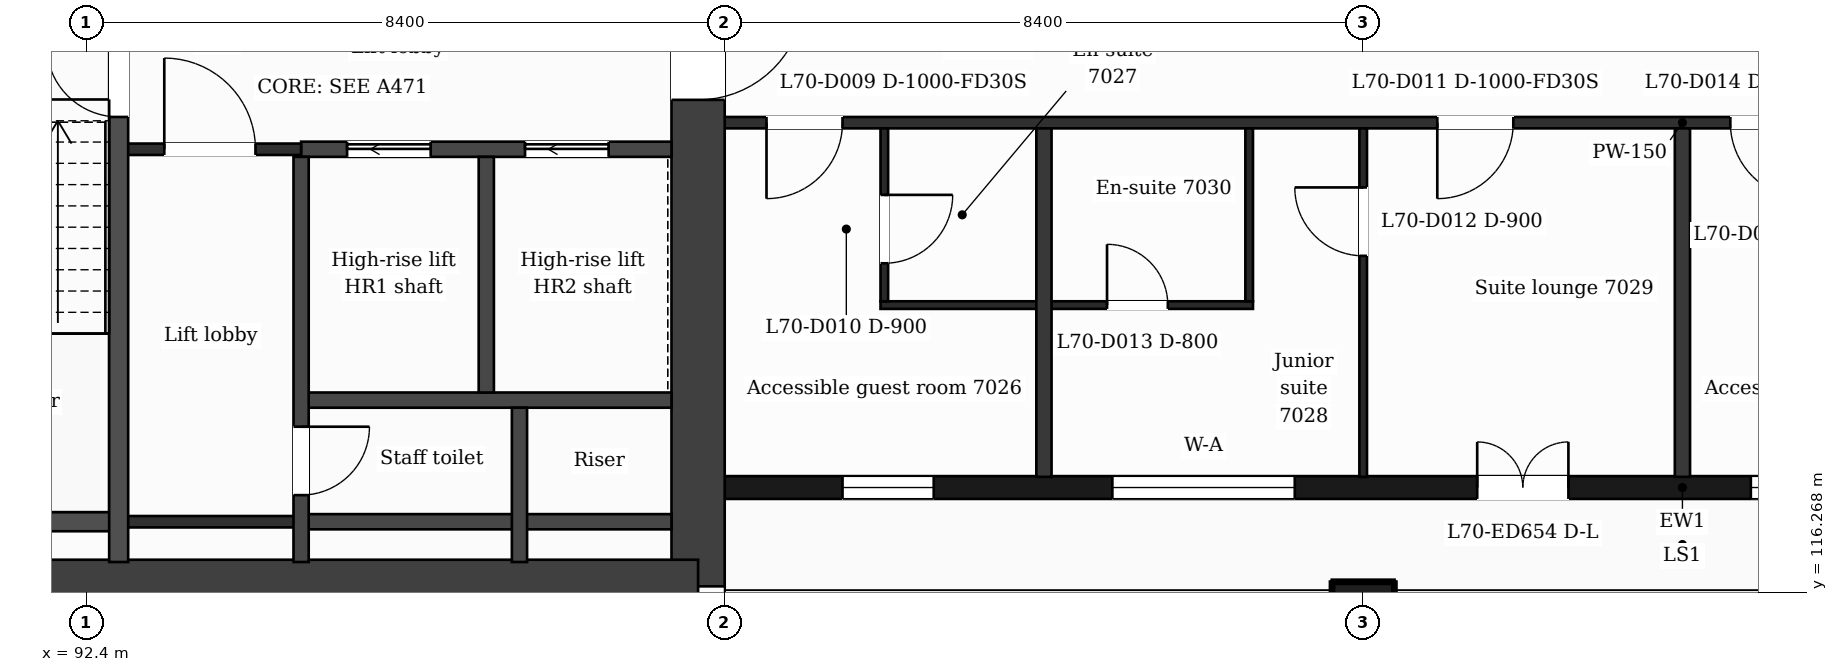
"""IFC4 building model, lengths in metres.
Left out: names, types, materials, properties, quantities, classifications, styles, units other than length and angle.
Written with IfcOpenShell. Run it as: python <this file> out.ifc"""

import sys

from ifc_helpers import new_model, si_unit, direction, frame, frame_2d, origin, origin_2d, place, context, subcontext, project, spatial, rectangle, extrude, element, fill, save


model = new_model("IFC4")
c1 = context("Model", 3, precision=1e-05, world=origin(), true_north=direction((0.0, 1.0)))
c2 = subcontext(c1, "Body", "Model", "MODEL_VIEW")
j1 = project(units=[si_unit("LENGTHUNIT", "METRE"), si_unit("PLANEANGLEUNIT", "RADIAN")], contexts=[c1])
p1 = place(None, origin())
s1 = spatial("IfcSite", under=j1, at=p1, CompositionType="ELEMENT")
p2 = place(p1, origin())
s2 = spatial("IfcBuilding", under=s1, at=p2, CompositionType="ELEMENT")
p3 = place(p2, frame((0.0, 0.0, 288.6)))
s3 = spatial("IfcBuildingStorey", under=s2, at=p3, CompositionType="ELEMENT", Elevation=288.6)
p4 = place(p3, frame((100.45, 132.05, 0.0), z_axis=(0.0, 0.0, 1.0), x_axis=(0.0, -1.0, 0.0)))
e1 = element("IfcWall", 1, at=p4, inside=s3, PredefinedType="SHEAR", context=c2, shape_type="SweptSolid", body=[
    extrude(rectangle(XDim=15.7, YDim=0.7, at=frame_2d((7.85, 0.0))), origin(), (0.0, 0.0, 1.0), 3.7),
])
p5 = place(p4, frame((7.9, 0.0, 0.0)))
e2 = element("IfcOpeningElement", 2, at=p5, cuts=e1, PredefinedType="OPENING", context=c2, shape_type="SweptSolid", body=[
    extrude(rectangle(XDim=1.4, YDim=2.1, at=frame_2d((0.7, 1.05))), frame((0.0, 0.36, 0.0), z_axis=(0.0, -1.0, 0.0), x_axis=(1.0, 0.0, 0.0)), (0.0, 0.0, 1.0), 0.72),
])
p6 = place(p3, frame((100.45, 116.35, 0.0), z_axis=(0.0, 0.0, 1.0), x_axis=(-1.0, 0.0, 0.0)))
e3 = element("IfcWall", 3, at=p6, inside=s3, PredefinedType="SHEAR", context=c2, shape_type="SweptSolid", body=[
    extrude(rectangle(XDim=13.627, YDim=0.7, at=frame_2d((6.813, 0.0))), origin(), (0.0, 0.0, 1.0), 3.7),
])
p7 = place(p3, frame((109.2, 116.0, 0.0), z_axis=(0.0, 0.0, 1.0), x_axis=(1.0, 0.0, 0.0)))
e4 = element("IfcColumn", 4, at=p7, inside=s3, PredefinedType="COLUMN", context=c2, shape_type="SweptSolid", body=[
    extrude(rectangle(XDim=0.8, YDim=0.8, at=origin_2d()), origin(), (0.0, 0.0, 1.0), 3.7),
])
p8 = place(p3, frame((100.8, 117.65, 0.0), z_axis=(0.0, 0.0, 1.0), x_axis=(1.0, 0.0, 0.0)))
e5 = element("IfcWall", 5, at=p8, inside=s3, PredefinedType="SOLIDWALL", context=c2, shape_type="SweptSolid", body=[
    extrude(rectangle(XDim=25.2, YDim=0.3, at=frame_2d((12.6, 0.0))), origin(), (0.0, 0.0, 1.0), 3.38),
])
p9 = place(p8, frame((1.55, 0.0, 0.9)))
e6 = element("IfcOpeningElement", 6, at=p9, cuts=e5, PredefinedType="OPENING", context=c2, shape_type="SweptSolid", body=[
    extrude(rectangle(XDim=1.2, YDim=2.1, at=frame_2d((0.6, 1.05))), frame((0.0, 0.16, 0.0), z_axis=(0.0, -1.0, 0.0), x_axis=(1.0, 0.0, 0.0)), (0.0, 0.0, 1.0), 0.32),
])
p10 = place(p8, frame((5.1, 0.0, 0.9)))
e7 = element("IfcOpeningElement", 7, at=p10, cuts=e5, PredefinedType="OPENING", context=c2, shape_type="SweptSolid", body=[
    extrude(rectangle(XDim=2.4, YDim=2.1, at=frame_2d((1.2, 1.05))), frame((0.0, 0.16, 0.0), z_axis=(0.0, -1.0, 0.0), x_axis=(1.0, 0.0, 0.0)), (0.0, 0.0, 1.0), 0.32),
])
p11 = place(p8, frame((9.9, 0.0, 0.0)))
e8 = element("IfcOpeningElement", 8, at=p11, cuts=e5, PredefinedType="OPENING", context=c2, shape_type="SweptSolid", body=[
    extrude(rectangle(XDim=1.2, YDim=2.4, at=frame_2d((0.6, 1.2))), frame((0.0, 0.16, 0.0), z_axis=(0.0, -1.0, 0.0), x_axis=(1.0, 0.0, 0.0)), (0.0, 0.0, 1.0), 0.32),
])
p12 = place(p8, frame((13.5, 0.0, 0.9)))
e9 = element("IfcOpeningElement", 9, at=p12, cuts=e5, PredefinedType="OPENING", context=c2, shape_type="SweptSolid", body=[
    extrude(rectangle(XDim=2.4, YDim=2.1, at=frame_2d((1.2, 1.05))), frame((0.0, 0.16, 0.0), z_axis=(0.0, -1.0, 0.0), x_axis=(1.0, 0.0, 0.0)), (0.0, 0.0, 1.0), 0.32),
])
p13 = place(p8, frame((17.7, 0.0, 0.9)))
e10 = element("IfcOpeningElement", 10, at=p13, cuts=e5, PredefinedType="OPENING", context=c2, shape_type="SweptSolid", body=[
    extrude(rectangle(XDim=2.4, YDim=2.1, at=frame_2d((1.2, 1.05))), frame((0.0, 0.16, 0.0), z_axis=(0.0, -1.0, 0.0), x_axis=(1.0, 0.0, 0.0)), (0.0, 0.0, 1.0), 0.32),
])
p14 = place(p8, frame((21.85, 0.0, 0.9)))
e11 = element("IfcOpeningElement", 11, at=p14, cuts=e5, PredefinedType="OPENING", context=c2, shape_type="SweptSolid", body=[
    extrude(rectangle(XDim=2.4, YDim=2.1, at=frame_2d((1.2, 1.05))), frame((0.0, 0.16, 0.0), z_axis=(0.0, -1.0, 0.0), x_axis=(1.0, 0.0, 0.0)), (0.0, 0.0, 1.0), 0.32),
])
p15 = place(p3, frame((95.227, 117.2, 0.0), z_axis=(0.0, 0.0, 1.0), x_axis=(1.0, 0.0, 0.0)))
e12 = element("IfcWall", 12, at=p15, inside=s3, PredefinedType="PARTITIONING", context=c2, shape_type="SweptSolid", body=[
    extrude(rectangle(XDim=4.873, YDim=0.2, at=frame_2d((2.437, 0.0))), origin(), (0.0, 0.0, 1.0), 3.38),
])
p16 = place(p3, frame((92.827, 117.2, 0.0), z_axis=(0.0, 0.0, 1.0), x_axis=(1.0, 0.0, 0.0)))
e13 = element("IfcWall", 13, at=p16, inside=s3, PredefinedType="PARTITIONING", context=c2, shape_type="SweptSolid", body=[
    extrude(rectangle(XDim=2.4, YDim=0.15, at=frame_2d((1.2, 0.0))), origin(), (0.0, 0.0, 1.0), 3.38),
])
p17 = place(p3, frame((89.552, 117.2, 0.0), z_axis=(0.0, 0.0, 1.0), x_axis=(1.0, 0.0, 0.0)))
e14 = element("IfcWall", 14, at=p17, inside=s3, PredefinedType="PARTITIONING", context=c2, shape_type="SweptSolid", body=[
    extrude(rectangle(XDim=3.275, YDim=0.25, at=frame_2d((1.637, 0.0))), origin(), (0.0, 0.0, 1.0), 3.38),
])
p18 = place(p3, frame((95.227, 118.8, 0.0), z_axis=(0.0, 0.0, 1.0), x_axis=(1.0, 0.0, 0.0)))
e15 = element("IfcWall", 15, at=p18, inside=s3, PredefinedType="PARTITIONING", context=c2, shape_type="SweptSolid", body=[
    extrude(rectangle(XDim=4.873, YDim=0.2, at=frame_2d((2.437, 0.0))), origin(), (0.0, 0.0, 1.0), 3.38),
])
p19 = place(p3, frame((102.85, 120.05, 0.0), z_axis=(0.0, 0.0, 1.0), x_axis=(1.0, 0.0, 0.0)))
e16 = element("IfcWall", 16, at=p19, inside=s3, PredefinedType="PARTITIONING", context=c2, shape_type="SweptSolid", body=[
    extrude(rectangle(XDim=4.9, YDim=0.1, at=frame_2d((2.45, 0.0))), origin(), (0.0, 0.0, 1.0), 3.38),
])
p20 = place(p19, frame((2.98, 0.0, 0.0)))
e17 = element("IfcOpeningElement", 17, at=p20, cuts=e16, PredefinedType="OPENING", context=c2, shape_type="SweptSolid", body=[
    extrude(rectangle(XDim=0.8, YDim=2.1, at=frame_2d((0.4, 1.05))), frame((0.0, 0.06, 0.0), z_axis=(0.0, -1.0, 0.0), x_axis=(1.0, 0.0, 0.0)), (0.0, 0.0, 1.0), 0.12),
])
p21 = place(p3, frame((95.227, 122.1, 0.0), z_axis=(0.0, 0.0, 1.0), x_axis=(1.0, 0.0, 0.0)))
e18 = element("IfcWall", 18, at=p21, inside=s3, PredefinedType="PARTITIONING", context=c2, shape_type="SweptSolid", body=[
    extrude(rectangle(XDim=4.873, YDim=0.2, at=frame_2d((2.437, 0.0))), origin(), (0.0, 0.0, 1.0), 3.38),
])
p22 = place(p21, frame((0.605, 0.0, 0.0)))
e19 = element("IfcOpeningElement", 19, at=p22, cuts=e18, PredefinedType="OPENING", context=c2, shape_type="SweptSolid", body=[
    extrude(rectangle(XDim=1.1, YDim=2.1, at=frame_2d((0.55, 1.05))), frame((0.0, 0.11, 0.0), z_axis=(0.0, -1.0, 0.0), x_axis=(1.0, 0.0, 0.0)), (0.0, 0.0, 1.0), 0.22),
])
p23 = place(p21, frame((2.946, 0.0, 0.0)))
e20 = element("IfcOpeningElement", 20, at=p23, cuts=e18, PredefinedType="OPENING", context=c2, shape_type="SweptSolid", body=[
    extrude(rectangle(XDim=1.1, YDim=2.1, at=frame_2d((0.55, 1.05))), frame((0.0, 0.11, 0.0), z_axis=(0.0, -1.0, 0.0), x_axis=(1.0, 0.0, 0.0)), (0.0, 0.0, 1.0), 0.22),
])
p24 = place(p3, frame((92.827, 122.1, 0.0), z_axis=(0.0, 0.0, 1.0), x_axis=(1.0, 0.0, 0.0)))
e21 = element("IfcWall", 21, at=p24, inside=s3, PredefinedType="PARTITIONING", context=c2, shape_type="SweptSolid", body=[
    extrude(rectangle(XDim=2.4, YDim=0.15, at=frame_2d((1.2, 0.0))), origin(), (0.0, 0.0, 1.0), 3.38),
])
p25 = place(p24, frame((0.6, 0.0, 0.0)))
e22 = element("IfcOpeningElement", 22, at=p25, cuts=e21, PredefinedType="OPENING", context=c2, shape_type="SweptSolid", body=[
    extrude(rectangle(XDim=1.2, YDim=2.1, at=frame_2d((0.6, 1.05))), frame((0.0, 0.085, 0.0), z_axis=(0.0, -1.0, 0.0), x_axis=(1.0, 0.0, 0.0)), (0.0, 0.0, 1.0), 0.17),
])
p26 = place(p3, frame((100.8, 122.45, 0.0), z_axis=(0.0, 0.0, 1.0), x_axis=(1.0, 0.0, 0.0)))
e23 = element("IfcWall", 23, at=p26, inside=s3, PredefinedType="PARTITIONING", context=c2, shape_type="SweptSolid", body=[
    extrude(rectangle(XDim=25.2, YDim=0.15, at=frame_2d((12.6, 0.0))), origin(), (0.0, 0.0, 1.0), 3.38),
])
p27 = place(p26, frame((0.55, 0.0, 0.0)))
e24 = element("IfcOpeningElement", 24, at=p27, cuts=e23, PredefinedType="OPENING", context=c2, shape_type="SweptSolid", body=[
    extrude(rectangle(XDim=1.0, YDim=2.1, at=frame_2d((0.5, 1.05))), frame((0.0, 0.085, 0.0), z_axis=(0.0, -1.0, 0.0), x_axis=(1.0, 0.0, 0.0)), (0.0, 0.0, 1.0), 0.17),
])
p28 = place(p26, frame((9.375, 0.0, 0.0)))
e25 = element("IfcOpeningElement", 25, at=p28, cuts=e23, PredefinedType="OPENING", context=c2, shape_type="SweptSolid", body=[
    extrude(rectangle(XDim=1.0, YDim=2.1, at=frame_2d((0.5, 1.05))), frame((0.0, 0.085, 0.0), z_axis=(0.0, -1.0, 0.0), x_axis=(1.0, 0.0, 0.0)), (0.0, 0.0, 1.0), 0.17),
])
p29 = place(p26, frame((13.23, 0.0, 0.0)))
e26 = element("IfcOpeningElement", 26, at=p29, cuts=e23, PredefinedType="OPENING", context=c2, shape_type="SweptSolid", body=[
    extrude(rectangle(XDim=1.0, YDim=2.1, at=frame_2d((0.5, 1.05))), frame((0.0, 0.085, 0.0), z_axis=(0.0, -1.0, 0.0), x_axis=(1.0, 0.0, 0.0)), (0.0, 0.0, 1.0), 0.17),
])
p30 = place(p26, frame((19.513, 0.0, 0.0)))
e27 = element("IfcOpeningElement", 27, at=p30, cuts=e23, PredefinedType="OPENING", context=c2, shape_type="SweptSolid", body=[
    extrude(rectangle(XDim=0.95, YDim=2.1, at=frame_2d((0.475, 1.05))), frame((0.0, 0.085, 0.0), z_axis=(0.0, -1.0, 0.0), x_axis=(1.0, 0.0, 0.0)), (0.0, 0.0, 1.0), 0.17),
])
p31 = place(p26, frame((21.7, 0.0, 0.0)))
e28 = element("IfcOpeningElement", 28, at=p31, cuts=e23, PredefinedType="OPENING", context=c2, shape_type="SweptSolid", body=[
    extrude(rectangle(XDim=1.0, YDim=2.1, at=frame_2d((0.5, 1.05))), frame((0.0, 0.085, 0.0), z_axis=(0.0, -1.0, 0.0), x_axis=(1.0, 0.0, 0.0)), (0.0, 0.0, 1.0), 0.17),
])
p32 = place(p3, frame((92.827, 116.67, 0.0), z_axis=(0.0, 0.0, 1.0), x_axis=(0.0, 1.0, 0.0)))
e29 = element("IfcWall", 29, at=p32, inside=s3, PredefinedType="PARTITIONING", context=c2, shape_type="SweptSolid", body=[
    extrude(rectangle(XDim=7.155, YDim=0.25, at=frame_2d((3.578, 0.0))), origin(), (0.0, 0.0, 1.0), 3.38),
])
p33 = place(p32, frame((5.855, 0.0, 0.0)))
e30 = element("IfcOpeningElement", 30, at=p33, cuts=e29, PredefinedType="OPENING", context=c2, shape_type="SweptSolid", body=[
    extrude(rectangle(XDim=0.95, YDim=2.1, at=frame_2d((0.475, 1.05))), frame((0.0, 0.135, 0.0), z_axis=(0.0, -1.0, 0.0), x_axis=(1.0, 0.0, 0.0)), (0.0, 0.0, 1.0), 0.27),
])
p34 = place(p3, frame((95.227, 116.67, 0.0), z_axis=(0.0, 0.0, 1.0), x_axis=(0.0, 1.0, 0.0)))
e31 = element("IfcWall", 31, at=p34, inside=s3, PredefinedType="PARTITIONING", context=c2, shape_type="SweptSolid", body=[
    extrude(rectangle(XDim=5.33, YDim=0.2, at=frame_2d((2.665, 0.0))), origin(), (0.0, 0.0, 1.0), 3.38),
])
p35 = place(p34, frame((0.88, 0.0, 0.0)))
e32 = element("IfcOpeningElement", 32, at=p35, cuts=e31, PredefinedType="OPENING", context=c2, shape_type="SweptSolid", body=[
    extrude(rectangle(XDim=0.9, YDim=2.1, at=frame_2d((0.45, 1.05))), frame((0.0, 0.11, 0.0), z_axis=(0.0, -1.0, 0.0), x_axis=(1.0, 0.0, 0.0)), (0.0, 0.0, 1.0), 0.22),
])
p36 = place(p3, frame((97.664, 118.9, 0.0), z_axis=(0.0, 0.0, 1.0), x_axis=(0.0, 1.0, 0.0)))
e33 = element("IfcWall", 33, at=p36, inside=s3, PredefinedType="PARTITIONING", context=c2, shape_type="SweptSolid", body=[
    extrude(rectangle(XDim=3.1, YDim=0.2, at=frame_2d((1.55, 0.0))), origin(), (0.0, 0.0, 1.0), 3.38),
])
p37 = place(p3, frame((98.1, 116.67, 0.0), z_axis=(0.0, 0.0, 1.0), x_axis=(0.0, 1.0, 0.0)))
e34 = element("IfcWall", 34, at=p37, inside=s3, PredefinedType="PARTITIONING", context=c2, shape_type="SweptSolid", body=[
    extrude(rectangle(XDim=2.03, YDim=0.2, at=frame_2d((1.015, 0.0))), origin(), (0.0, 0.0, 1.0), 3.38),
])
p38 = place(p3, frame((102.9, 120.1, 0.0), z_axis=(0.0, 0.0, 1.0), x_axis=(0.0, 1.0, 0.0)))
e35 = element("IfcWall", 35, at=p38, inside=s3, PredefinedType="PARTITIONING", context=c2, shape_type="SweptSolid", body=[
    extrude(rectangle(XDim=2.275, YDim=0.1, at=frame_2d((1.137, 0.0))), origin(), (0.0, 0.0, 1.0), 3.38),
])
p39 = place(p38, frame((0.5, 0.0, 0.0)))
e36 = element("IfcOpeningElement", 36, at=p39, cuts=e35, PredefinedType="OPENING", context=c2, shape_type="SweptSolid", body=[
    extrude(rectangle(XDim=0.9, YDim=2.1, at=frame_2d((0.45, 1.05))), frame((0.0, 0.06, 0.0), z_axis=(0.0, -1.0, 0.0), x_axis=(1.0, 0.0, 0.0)), (0.0, 0.0, 1.0), 0.12),
])
p40 = place(p3, frame((105.0, 117.79, 0.0), z_axis=(0.0, 0.0, 1.0), x_axis=(0.0, 1.0, 0.0)))
e37 = element("IfcWall", 37, at=p40, inside=s3, PredefinedType="PARTITIONING", context=c2, shape_type="SweptSolid", body=[
    extrude(rectangle(XDim=4.585, YDim=0.2, at=frame_2d((2.292, 0.0))), origin(), (0.0, 0.0, 1.0), 3.38),
])
p41 = place(p3, frame((107.7, 120.1, 0.0), z_axis=(0.0, 0.0, 1.0), x_axis=(0.0, 1.0, 0.0)))
e38 = element("IfcWall", 38, at=p41, inside=s3, PredefinedType="PARTITIONING", context=c2, shape_type="SweptSolid", body=[
    extrude(rectangle(XDim=2.275, YDim=0.1, at=frame_2d((1.137, 0.0))), origin(), (0.0, 0.0, 1.0), 3.38),
])
p42 = place(p3, frame((109.2, 117.79, 0.0), z_axis=(0.0, 0.0, 1.0), x_axis=(0.0, 1.0, 0.0)))
e39 = element("IfcWall", 39, at=p42, inside=s3, PredefinedType="PARTITIONING", context=c2, shape_type="SweptSolid", body=[
    extrude(rectangle(XDim=4.585, YDim=0.1, at=frame_2d((2.292, 0.0))), origin(), (0.0, 0.0, 1.0), 3.38),
])
p43 = place(p42, frame((2.908, 0.0, 0.0)))
e40 = element("IfcOpeningElement", 40, at=p43, cuts=e39, PredefinedType="OPENING", context=c2, shape_type="SweptSolid", body=[
    extrude(rectangle(XDim=0.9, YDim=2.1, at=frame_2d((0.45, 1.05))), frame((0.0, 0.06, 0.0), z_axis=(0.0, -1.0, 0.0), x_axis=(1.0, 0.0, 0.0)), (0.0, 0.0, 1.0), 0.12),
])
p44 = place(p3, frame((113.4, 117.79, 0.0), z_axis=(0.0, 0.0, 1.0), x_axis=(0.0, 1.0, 0.0)))
e41 = element("IfcWall", 41, at=p44, inside=s3, PredefinedType="PARTITIONING", context=c2, shape_type="SweptSolid", body=[
    extrude(rectangle(XDim=4.585, YDim=0.2, at=frame_2d((2.292, 0.0))), origin(), (0.0, 0.0, 1.0), 3.38),
])
p45 = place(p9, origin())
e42 = element("IfcWindow", 42, at=p45, inside=s3, PartitioningType="SINGLE_PANEL", PredefinedType="WINDOW", context=c2, shape_type="SweptSolid", body=[
    extrude(rectangle(XDim=1.2, YDim=2.1, at=frame_2d((0.6, 1.05))), frame((0.0, 0.03, 0.0), z_axis=(0.0, -1.0, 0.0), x_axis=(1.0, 0.0, 0.0)), (0.0, 0.0, 1.0), 0.06),
])
fill(e6, e42)
p46 = place(p10, origin())
e43 = element("IfcWindow", 43, at=p46, inside=s3, PartitioningType="SINGLE_PANEL", PredefinedType="WINDOW", context=c2, shape_type="SweptSolid", body=[
    extrude(rectangle(XDim=2.4, YDim=2.1, at=frame_2d((1.2, 1.05))), frame((0.0, 0.03, 0.0), z_axis=(0.0, -1.0, 0.0), x_axis=(1.0, 0.0, 0.0)), (0.0, 0.0, 1.0), 0.06),
])
fill(e7, e43)
p47 = place(p11, origin())
e44 = element("IfcDoor", 44, at=p47, inside=s3, OperationType="DOUBLE_DOOR_SINGLE_SWING", PredefinedType="DOOR", context=c2, shape_type="SweptSolid", body=[
    extrude(rectangle(XDim=1.2, YDim=2.4, at=frame_2d((0.6, 1.2))), frame((0.0, 0.025, 0.0), z_axis=(0.0, -1.0, 0.0), x_axis=(1.0, 0.0, 0.0)), (0.0, 0.0, 1.0), 0.05),
])
fill(e8, e44)
p48 = place(p12, origin())
e45 = element("IfcWindow", 45, at=p48, inside=s3, PartitioningType="SINGLE_PANEL", PredefinedType="WINDOW", context=c2, shape_type="SweptSolid", body=[
    extrude(rectangle(XDim=2.4, YDim=2.1, at=frame_2d((1.2, 1.05))), frame((0.0, 0.03, 0.0), z_axis=(0.0, -1.0, 0.0), x_axis=(1.0, 0.0, 0.0)), (0.0, 0.0, 1.0), 0.06),
])
fill(e9, e45)
p49 = place(p25, origin())
e46 = element("IfcDoor", 46, at=p49, inside=s3, OperationType="SINGLE_SWING_LEFT", PredefinedType="DOOR", context=c2, shape_type="SweptSolid", body=[
    extrude(rectangle(XDim=1.2, YDim=2.1, at=frame_2d((0.6, 1.05))), frame((0.0, 0.025, 0.0), z_axis=(0.0, -1.0, 0.0), x_axis=(1.0, 0.0, 0.0)), (0.0, 0.0, 1.0), 0.05),
])
fill(e22, e46)
p50 = place(p22, origin())
e47 = element("IfcDoor", 47, at=p50, inside=s3, OperationType="SLIDING_TO_LEFT", PredefinedType="DOOR", context=c2, shape_type="SweptSolid", body=[
    extrude(rectangle(XDim=1.1, YDim=2.1, at=frame_2d((0.55, 1.05))), frame((0.0, 0.025, 0.0), z_axis=(0.0, -1.0, 0.0), x_axis=(1.0, 0.0, 0.0)), (0.0, 0.0, 1.0), 0.05),
])
fill(e19, e47)
p51 = place(p23, origin())
e48 = element("IfcDoor", 48, at=p51, inside=s3, OperationType="SLIDING_TO_LEFT", PredefinedType="DOOR", context=c2, shape_type="SweptSolid", body=[
    extrude(rectangle(XDim=1.1, YDim=2.1, at=frame_2d((0.55, 1.05))), frame((0.0, 0.025, 0.0), z_axis=(0.0, -1.0, 0.0), x_axis=(1.0, 0.0, 0.0)), (0.0, 0.0, 1.0), 0.05),
])
fill(e20, e48)
p52 = place(p33, origin())
e49 = element("IfcDoor", 49, at=p52, inside=s3, OperationType="SINGLE_SWING_RIGHT", PredefinedType="DOOR", context=c2, shape_type="SweptSolid", body=[
    extrude(rectangle(XDim=0.95, YDim=2.1, at=frame_2d((0.475, 1.05))), frame((0.0, 0.025, 0.0), z_axis=(0.0, -1.0, 0.0), x_axis=(1.0, 0.0, 0.0)), (0.0, 0.0, 1.0), 0.05),
])
fill(e30, e49)
p53 = place(p35, origin())
e50 = element("IfcDoor", 50, at=p53, inside=s3, OperationType="SINGLE_SWING_RIGHT", PredefinedType="DOOR", context=c2, shape_type="SweptSolid", body=[
    extrude(rectangle(XDim=0.9, YDim=2.1, at=frame_2d((0.45, 1.05))), frame((0.0, 0.025, 0.0), z_axis=(0.0, -1.0, 0.0), x_axis=(1.0, 0.0, 0.0)), (0.0, 0.0, 1.0), 0.05),
])
fill(e32, e50)
p54 = place(p27, origin())
e51 = element("IfcDoor", 51, at=p54, inside=s3, OperationType="SINGLE_SWING_LEFT", PredefinedType="DOOR", context=c2, shape_type="SweptSolid", body=[
    extrude(rectangle(XDim=1.0, YDim=2.1, at=frame_2d((0.5, 1.05))), frame((0.0, 0.025, 0.0), z_axis=(0.0, -1.0, 0.0), x_axis=(1.0, 0.0, 0.0)), (0.0, 0.0, 1.0), 0.05),
])
fill(e24, e51)
p55 = place(p39, origin())
e52 = element("IfcDoor", 52, at=p55, inside=s3, OperationType="SINGLE_SWING_RIGHT", PredefinedType="DOOR", context=c2, shape_type="SweptSolid", body=[
    extrude(rectangle(XDim=0.9, YDim=2.1, at=frame_2d((0.45, 1.05))), frame((0.0, 0.025, 0.0), z_axis=(0.0, -1.0, 0.0), x_axis=(1.0, 0.0, 0.0)), (0.0, 0.0, 1.0), 0.05),
])
fill(e36, e52)
p56 = place(p28, origin())
e53 = element("IfcDoor", 53, at=p56, inside=s3, OperationType="SINGLE_SWING_LEFT", PredefinedType="DOOR", context=c2, shape_type="SweptSolid", body=[
    extrude(rectangle(XDim=1.0, YDim=2.1, at=frame_2d((0.5, 1.05))), frame((0.0, 0.025, 0.0), z_axis=(0.0, -1.0, 0.0), x_axis=(1.0, 0.0, 0.0)), (0.0, 0.0, 1.0), 0.05),
])
fill(e25, e53)
p57 = place(p43, origin())
e54 = element("IfcDoor", 54, at=p57, inside=s3, OperationType="SINGLE_SWING_RIGHT", PredefinedType="DOOR", context=c2, shape_type="SweptSolid", body=[
    extrude(rectangle(XDim=0.9, YDim=2.1, at=frame_2d((0.45, 1.05))), frame((0.0, 0.025, 0.0), z_axis=(0.0, -1.0, 0.0), x_axis=(1.0, 0.0, 0.0)), (0.0, 0.0, 1.0), 0.05),
])
fill(e40, e54)
p58 = place(p20, origin())
e55 = element("IfcDoor", 55, at=p58, inside=s3, OperationType="SINGLE_SWING_LEFT", PredefinedType="DOOR", context=c2, shape_type="SweptSolid", body=[
    extrude(rectangle(XDim=0.8, YDim=2.1, at=frame_2d((0.4, 1.05))), frame((0.0, 0.025, 0.0), z_axis=(0.0, -1.0, 0.0), x_axis=(1.0, 0.0, 0.0)), (0.0, 0.0, 1.0), 0.05),
])
fill(e17, e55)
p59 = place(p29, origin())
e56 = element("IfcDoor", 56, at=p59, inside=s3, OperationType="SINGLE_SWING_RIGHT", PredefinedType="DOOR", context=c2, shape_type="SweptSolid", body=[
    extrude(rectangle(XDim=1.0, YDim=2.1, at=frame_2d((0.5, 1.05))), frame((0.0, 0.025, 0.0), z_axis=(0.0, -1.0, 0.0), x_axis=(1.0, 0.0, 0.0)), (0.0, 0.0, 1.0), 0.05),
])
fill(e26, e56)
p60 = place(p5, origin())
e57 = element("IfcDoor", 57, at=p60, inside=s3, OperationType="SINGLE_SWING_LEFT", PredefinedType="DOOR", context=c2, shape_type="SweptSolid", body=[
    extrude(rectangle(XDim=1.4, YDim=2.1, at=frame_2d((0.7, 1.05))), frame((0.0, 0.025, 0.0), z_axis=(0.0, -1.0, 0.0), x_axis=(1.0, 0.0, 0.0)), (0.0, 0.0, 1.0), 0.05),
])
fill(e2, e57)
save(model, sys.argv[1])
